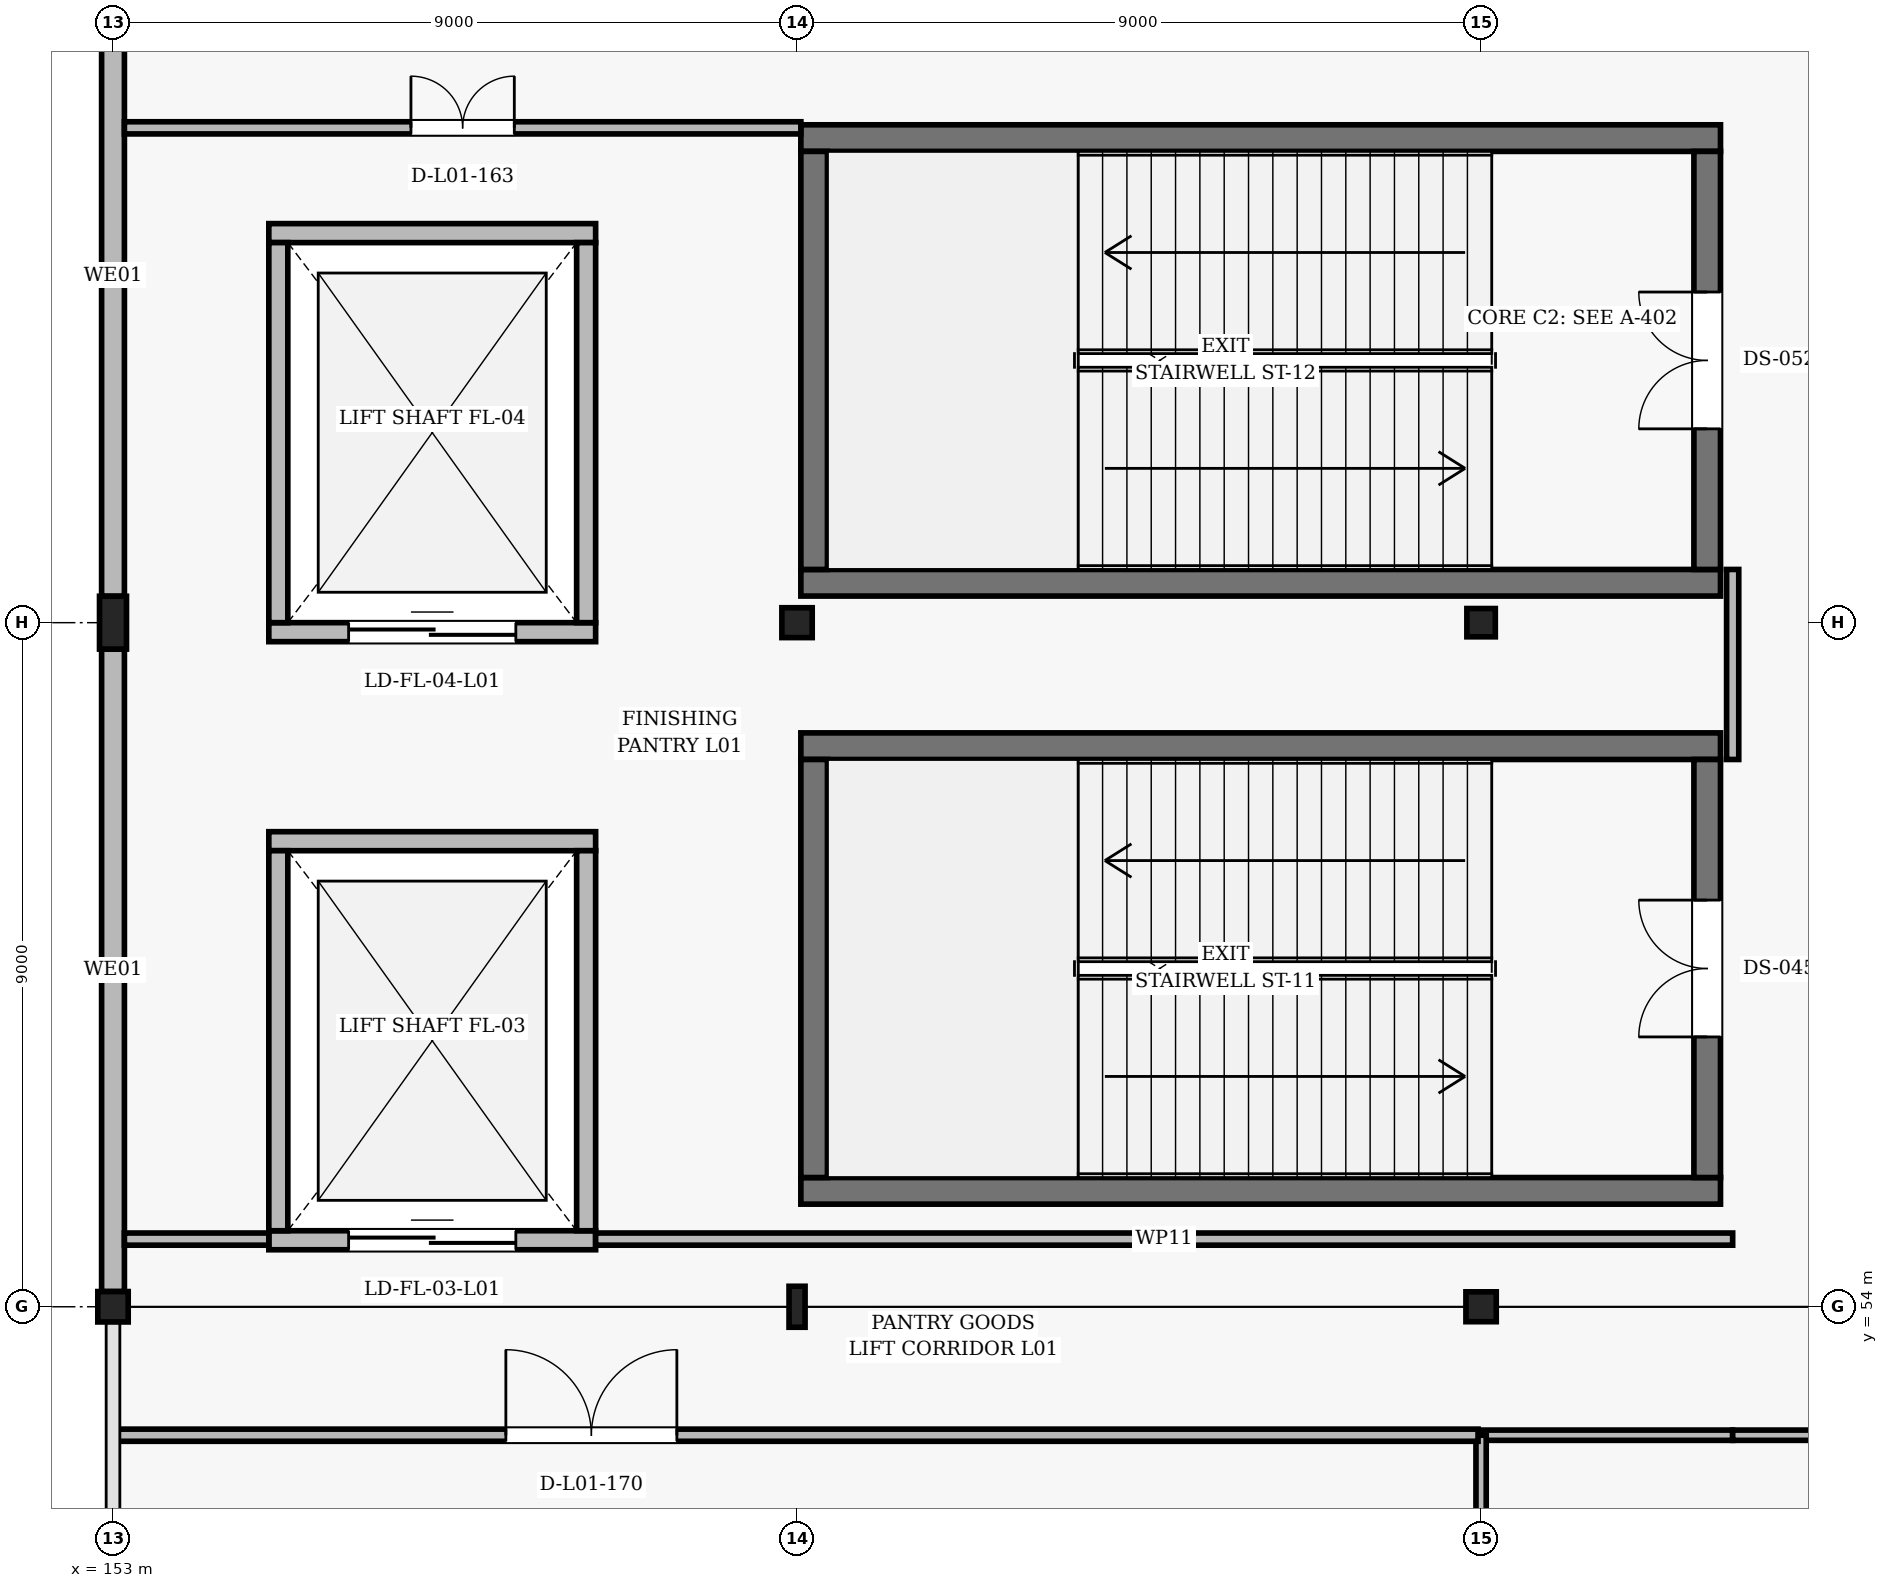
"""IFC4 building model, lengths in metres.
Left out: names, types, materials, properties, quantities, classifications, styles, units other than length and angle.
Written with IfcOpenShell. Run it as: python <this file> out.ifc"""

import sys

from ifc_helpers import new_model, si_unit, direction, frame, frame_2d, origin, origin_2d, place, context, subcontext, project, spatial, rectangle, hollow_rectangle, i_section, extrude, element, fill, save


model = new_model("IFC4")
c1 = context("Model", 3, precision=1e-05, world=origin(), true_north=direction((0.0, 1.0)))
c2 = subcontext(c1, "Body", "Model", "MODEL_VIEW")
j1 = project(units=[si_unit("LENGTHUNIT", "METRE"), si_unit("PLANEANGLEUNIT", "RADIAN")], contexts=[c1])
p1 = place(None, origin())
s1 = spatial("IfcSite", under=j1, at=p1, CompositionType="ELEMENT")
p2 = place(p1, origin())
s2 = spatial("IfcBuilding", under=s1, at=p2, CompositionType="ELEMENT")
p3 = place(p2, frame((0.0, 0.0, 5.4)))
s3 = spatial("IfcBuildingStorey", under=s2, at=p3, CompositionType="ELEMENT", Elevation=5.4)
p4 = place(p3, frame((153.0, 54.0, 0.0), z_axis=(0.0, 0.0, 1.0), x_axis=(1.0, 0.0, 0.0)))
e1 = element("IfcColumn", 1, at=p4, inside=s3, PredefinedType="COLUMN", context=c2, shape_type="SweptSolid", body=[
    extrude(hollow_rectangle(XDim=0.4, YDim=0.4, WallThickness=0.016, InnerFilletRadius=0.016, OuterFilletRadius=0.032, at=origin_2d()), origin(), (0.0, 0.0, 1.0), 5.4),
])
p5 = place(p3, frame((153.0, 63.0, 0.0), z_axis=(0.0, 0.0, 1.0), x_axis=(1.0, 0.0, 0.0)))
e2 = element("IfcColumn", 2, at=p5, inside=s3, PredefinedType="COLUMN", context=c2, shape_type="SweptSolid", body=[
    extrude(i_section(OverallWidth=0.355, OverallDepth=0.695, WebThickness=0.015, FlangeThickness=0.025, FilletRadius=0.018, at=origin_2d()), origin(), (0.0, 0.0, 1.0), 5.4),
])
p6 = place(p3, frame((162.0, 54.0, 0.0), z_axis=(0.0, 0.0, 1.0), x_axis=(1.0, 0.0, 0.0)))
e3 = element("IfcColumn", 3, at=p6, inside=s3, PredefinedType="COLUMN", context=c2, shape_type="SweptSolid", body=[
    extrude(i_section(OverallWidth=0.211, OverallDepth=0.539, WebThickness=0.012, FlangeThickness=0.019, FilletRadius=0.014, at=origin_2d()), origin(), (0.0, 0.0, 1.0), 5.4),
])
for number, where, z_axis, x_axis in (
    (4, (162.0, 63.0, 0.0), (0.0, 0.0, 1.0), (1.0, 0.0, 0.0)),
    (5, (171.0, 54.0, 0.0), (0.0, 0.0, 1.0), (1.0, 0.0, 0.0)),
):
    element("IfcColumn", number, at=place(p3, frame(where, z_axis=z_axis, x_axis=x_axis)), inside=s3, PredefinedType="COLUMN", context=c2, shape_type="SweptSolid", body=[
        extrude(i_section(OverallWidth=0.399, OverallDepth=0.393, WebThickness=0.023, FlangeThickness=0.037, FilletRadius=0.018, at=origin_2d()), origin(), (0.0, 0.0, 1.0), 5.4),
    ])
p7 = place(p3, frame((171.0, 63.0, 0.0), z_axis=(0.0, 0.0, 1.0), x_axis=(1.0, 0.0, 0.0)))
e6 = element("IfcColumn", 6, at=p7, inside=s3, PredefinedType="COLUMN", context=c2, shape_type="SweptSolid", body=[
    extrude(i_section(OverallWidth=0.374, OverallDepth=0.372, WebThickness=0.016, FlangeThickness=0.026, FilletRadius=0.016, at=origin_2d()), origin(), (0.0, 0.0, 1.0), 5.4),
])
p8 = place(p3, frame((153.0, 54.2, 0.0), z_axis=(0.0, 0.0, 1.0), x_axis=(0.0, 1.0, 0.0)))
e7 = element("IfcWall", 7, at=p8, inside=s3, PredefinedType="SOLIDWALL", context=c2, shape_type="SweptSolid", body=[
    extrude(rectangle(XDim=8.453, YDim=0.3, at=frame_2d((4.226, 0.0))), origin(), (0.0, 0.0, 1.0), 4.392),
])
p9 = place(p3, frame((153.0, 63.347, 0.0), z_axis=(0.0, 0.0, 1.0), x_axis=(0.0, 1.0, 0.0)))
e8 = element("IfcWall", 8, at=p9, inside=s3, PredefinedType="SOLIDWALL", context=c2, shape_type="SweptSolid", body=[
    extrude(rectangle(XDim=8.44, YDim=0.3, at=frame_2d((4.22, 0.0))), origin(), (0.0, 0.0, 1.0), 4.47),
])
for number, where, z_axis, x_axis in (
    (9, (162.05, 55.525, 0.0), (0.0, 0.0, 1.0), (1.0, 0.0, 0.0)),
    (10, (174.15, 61.375, 0.0), (0.0, 0.0, 1.0), (-1.0, 0.0, 0.0)),
):
    element("IfcWall", number, at=place(p3, frame(where, z_axis=z_axis, x_axis=x_axis)), inside=s3, PredefinedType="SHEAR", context=c2, shape_type="SweptSolid", body=[
        extrude(rectangle(XDim=12.1, YDim=0.35, at=frame_2d((6.05, 0.0))), origin(), (0.0, 0.0, 1.0), 5.18),
    ])
p10 = place(p3, frame((162.225, 61.2, 0.0), z_axis=(0.0, 0.0, 1.0), x_axis=(0.0, -1.0, 0.0)))
e11 = element("IfcWall", 11, at=p10, inside=s3, PredefinedType="SHEAR", context=c2, shape_type="SweptSolid", body=[
    extrude(rectangle(XDim=5.5, YDim=0.35, at=frame_2d((2.75, 0.0))), origin(), (0.0, 0.0, 1.0), 5.18),
])
p11 = place(p3, frame((173.975, 55.7, 0.0), z_axis=(0.0, 0.0, 1.0), x_axis=(0.0, 1.0, 0.0)))
e12 = element("IfcWall", 12, at=p11, inside=s3, PredefinedType="SHEAR", context=c2, shape_type="SweptSolid", body=[
    extrude(rectangle(XDim=5.5, YDim=0.35, at=frame_2d((2.75, 0.0))), origin(), (0.0, 0.0, 1.0), 5.18),
])
p12 = place(p11, frame((1.85, 0.0, 0.0)))
e13 = element("IfcOpeningElement", 13, at=p12, cuts=e12, PredefinedType="OPENING", context=c2, shape_type="SweptSolid", body=[
    extrude(rectangle(XDim=1.8, YDim=2.2, at=frame_2d((0.9, 1.1))), frame((0.0, 0.185, 0.0), z_axis=(0.0, -1.0, 0.0), x_axis=(1.0, 0.0, 0.0)), (0.0, 0.0, 1.0), 0.37),
])
for number, where, z_axis, x_axis in (
    (14, (162.05, 63.525, 0.0), (0.0, 0.0, 1.0), (1.0, 0.0, 0.0)),
    (15, (174.15, 69.375, 0.0), (0.0, 0.0, 1.0), (-1.0, 0.0, 0.0)),
):
    element("IfcWall", number, at=place(p3, frame(where, z_axis=z_axis, x_axis=x_axis)), inside=s3, PredefinedType="SHEAR", context=c2, shape_type="SweptSolid", body=[
        extrude(rectangle(XDim=12.1, YDim=0.35, at=frame_2d((6.05, 0.0))), origin(), (0.0, 0.0, 1.0), 5.18),
    ])
p13 = place(p3, frame((162.225, 69.2, 0.0), z_axis=(0.0, 0.0, 1.0), x_axis=(0.0, -1.0, 0.0)))
e16 = element("IfcWall", 16, at=p13, inside=s3, PredefinedType="SHEAR", context=c2, shape_type="SweptSolid", body=[
    extrude(rectangle(XDim=5.5, YDim=0.35, at=frame_2d((2.75, 0.0))), origin(), (0.0, 0.0, 1.0), 5.18),
])
p14 = place(p3, frame((173.975, 63.7, 0.0), z_axis=(0.0, 0.0, 1.0), x_axis=(0.0, 1.0, 0.0)))
e17 = element("IfcWall", 17, at=p14, inside=s3, PredefinedType="SHEAR", context=c2, shape_type="SweptSolid", body=[
    extrude(rectangle(XDim=5.5, YDim=0.35, at=frame_2d((2.75, 0.0))), origin(), (0.0, 0.0, 1.0), 5.18),
])
p15 = place(p14, frame((1.85, 0.0, 0.0)))
e18 = element("IfcOpeningElement", 18, at=p15, cuts=e17, PredefinedType="OPENING", context=c2, shape_type="SweptSolid", body=[
    extrude(rectangle(XDim=1.8, YDim=2.2, at=frame_2d((0.9, 1.1))), frame((0.0, 0.185, 0.0), z_axis=(0.0, -1.0, 0.0), x_axis=(1.0, 0.0, 0.0)), (0.0, 0.0, 1.0), 0.37),
])
p16 = place(p3, frame((155.05, 54.875, 0.0), z_axis=(0.0, 0.0, 1.0), x_axis=(1.0, 0.0, 0.0)))
e19 = element("IfcWall", 19, at=p16, inside=s3, PredefinedType="SOLIDWALL", context=c2, shape_type="SweptSolid", body=[
    extrude(rectangle(XDim=4.3, YDim=0.25, at=frame_2d((2.15, 0.0))), origin(), (0.0, 0.0, 1.0), 5.16),
])
p17 = place(p16, frame((1.05, 0.0, 0.0)))
e20 = element("IfcOpeningElement", 20, at=p17, cuts=e19, PredefinedType="OPENING", context=c2, shape_type="SweptSolid", body=[
    extrude(rectangle(XDim=2.2, YDim=2.5, at=frame_2d((1.1, 1.25))), frame((0.0, 0.135, 0.0), z_axis=(0.0, -1.0, 0.0), x_axis=(1.0, 0.0, 0.0)), (0.0, 0.0, 1.0), 0.27),
])
p18 = place(p3, frame((159.35, 60.125, 0.0), z_axis=(0.0, 0.0, 1.0), x_axis=(-1.0, 0.0, 0.0)))
e21 = element("IfcWall", 21, at=p18, inside=s3, PredefinedType="SOLIDWALL", context=c2, shape_type="SweptSolid", body=[
    extrude(rectangle(XDim=4.3, YDim=0.25, at=frame_2d((2.15, 0.0))), origin(), (0.0, 0.0, 1.0), 5.16),
])
for number, where, z_axis, x_axis in (
    (22, (155.175, 60.0, 0.0), (0.0, 0.0, 1.0), (0.0, -1.0, 0.0)),
    (23, (159.225, 55.0, 0.0), (0.0, 0.0, 1.0), (0.0, 1.0, 0.0)),
):
    element("IfcWall", number, at=place(p3, frame(where, z_axis=z_axis, x_axis=x_axis)), inside=s3, PredefinedType="SOLIDWALL", context=c2, shape_type="SweptSolid", body=[
        extrude(rectangle(XDim=5.0, YDim=0.25, at=frame_2d((2.5, 0.0))), origin(), (0.0, 0.0, 1.0), 5.16),
    ])
p19 = place(p3, frame((155.05, 62.875, 0.0), z_axis=(0.0, 0.0, 1.0), x_axis=(1.0, 0.0, 0.0)))
e24 = element("IfcWall", 24, at=p19, inside=s3, PredefinedType="SOLIDWALL", context=c2, shape_type="SweptSolid", body=[
    extrude(rectangle(XDim=4.3, YDim=0.25, at=frame_2d((2.15, 0.0))), origin(), (0.0, 0.0, 1.0), 5.16),
])
p20 = place(p19, frame((1.05, 0.0, 0.0)))
e25 = element("IfcOpeningElement", 25, at=p20, cuts=e24, PredefinedType="OPENING", context=c2, shape_type="SweptSolid", body=[
    extrude(rectangle(XDim=2.2, YDim=2.5, at=frame_2d((1.1, 1.25))), frame((0.0, 0.135, 0.0), z_axis=(0.0, -1.0, 0.0), x_axis=(1.0, 0.0, 0.0)), (0.0, 0.0, 1.0), 0.27),
])
p21 = place(p3, frame((159.35, 68.125, 0.0), z_axis=(0.0, 0.0, 1.0), x_axis=(-1.0, 0.0, 0.0)))
e26 = element("IfcWall", 26, at=p21, inside=s3, PredefinedType="SOLIDWALL", context=c2, shape_type="SweptSolid", body=[
    extrude(rectangle(XDim=4.3, YDim=0.25, at=frame_2d((2.15, 0.0))), origin(), (0.0, 0.0, 1.0), 5.16),
])
for number, where, z_axis, x_axis in (
    (27, (155.175, 68.0, 0.0), (0.0, 0.0, 1.0), (0.0, -1.0, 0.0)),
    (28, (159.225, 63.0, 0.0), (0.0, 0.0, 1.0), (0.0, 1.0, 0.0)),
):
    element("IfcWall", number, at=place(p3, frame(where, z_axis=z_axis, x_axis=x_axis)), inside=s3, PredefinedType="SOLIDWALL", context=c2, shape_type="SweptSolid", body=[
        extrude(rectangle(XDim=5.0, YDim=0.25, at=frame_2d((2.5, 0.0))), origin(), (0.0, 0.0, 1.0), 5.16),
    ])
p22 = place(p3, frame((153.15, 69.51, 0.0), z_axis=(0.0, 0.0, 1.0), x_axis=(1.0, 0.0, 0.0)))
e29 = element("IfcWall", 29, at=p22, inside=s3, PredefinedType="PARTITIONING", context=c2, shape_type="SweptSolid", body=[
    extrude(rectangle(XDim=8.9, YDim=0.16, at=frame_2d((4.45, 0.0))), origin(), (0.0, 0.0, 1.0), 4.47),
])
p23 = place(p22, frame((3.77, 0.0, 0.0)))
e30 = element("IfcOpeningElement", 30, at=p23, cuts=e29, PredefinedType="OPENING", context=c2, shape_type="SweptSolid", body=[
    extrude(rectangle(XDim=1.36, YDim=2.28, at=frame_2d((0.68, 1.14))), frame((0.0, 0.09, 0.0), z_axis=(0.0, -1.0, 0.0), x_axis=(1.0, 0.0, 0.0)), (0.0, 0.0, 1.0), 0.18),
])
p24 = place(p3, frame((174.31, 63.7, 0.0), z_axis=(0.0, 0.0, 1.0), x_axis=(0.0, -1.0, 0.0)))
e31 = element("IfcWall", 31, at=p24, inside=s3, PredefinedType="PARTITIONING", context=c2, shape_type="SweptSolid", body=[
    extrude(rectangle(XDim=2.5, YDim=0.16, at=frame_2d((1.25, 0.0))), origin(), (0.0, 0.0, 1.0), 4.554),
])
p25 = place(p3, frame((174.31, 54.89, 0.0), z_axis=(0.0, 0.0, 1.0), x_axis=(-1.0, 0.0, 0.0)))
e32 = element("IfcWall", 32, at=p25, inside=s3, PredefinedType="PARTITIONING", context=c2, shape_type="SweptSolid", body=[
    extrude(rectangle(XDim=14.96, YDim=0.16, at=frame_2d((7.48, 0.0))), origin(), (0.0, 0.0, 1.0), 4.481),
])
p26 = place(p3, frame((155.05, 54.89, 0.0), z_axis=(0.0, 0.0, 1.0), x_axis=(-1.0, 0.0, 0.0)))
e33 = element("IfcWall", 33, at=p26, inside=s3, PredefinedType="PARTITIONING", context=c2, shape_type="SweptSolid", body=[
    extrude(rectangle(XDim=1.9, YDim=0.16, at=frame_2d((0.95, 0.0))), origin(), (0.0, 0.0, 1.0), 4.392),
])
p27 = place(p3, frame((171.0, 52.31, 0.0), z_axis=(0.0, 0.0, 1.0), x_axis=(1.0, 0.0, 0.0)))
e34 = element("IfcWall", 34, at=p27, inside=s3, PredefinedType="PARTITIONING", context=c2, shape_type="SweptSolid", body=[
    extrude(rectangle(XDim=3.31, YDim=0.135, at=frame_2d((1.655, 0.0))), origin(), (0.0, 0.0, 1.0), 4.27),
])
p28 = place(p3, frame((174.31, 52.31, 0.0), z_axis=(0.0, 0.0, 1.0), x_axis=(1.0, 0.0, 0.0)))
e35 = element("IfcWall", 35, at=p28, inside=s3, PredefinedType="PARTITIONING", context=c2, shape_type="SweptSolid", body=[
    extrude(rectangle(XDim=4.94, YDim=0.135, at=frame_2d((2.47, 0.0))), origin(), (0.0, 0.0, 1.0), 4.668),
])
p29 = place(p28, frame((1.98, 0.0, 0.0)))
e36 = element("IfcOpeningElement", 36, at=p29, cuts=e35, PredefinedType="OPENING", context=c2, shape_type="SweptSolid", body=[
    extrude(rectangle(XDim=0.98, YDim=2.15, at=frame_2d((0.49, 1.075))), frame((0.0, 0.078, 0.0), z_axis=(0.0, -1.0, 0.0), x_axis=(1.0, 0.0, 0.0)), (0.0, 0.0, 1.0), 0.155),
])
p30 = place(p3, frame((171.0, 36.0, 0.0), z_axis=(0.0, 0.0, 1.0), x_axis=(0.0, 1.0, 0.0)))
e37 = element("IfcWall", 37, at=p30, inside=s3, PredefinedType="PARTITIONING", context=c2, shape_type="SweptSolid", body=[
    extrude(rectangle(XDim=16.31, YDim=0.135, at=frame_2d((8.155, 0.0))), origin(), (0.0, 0.0, 1.0), 3.125),
])
p31 = place(p3, frame((153.012, 52.31, 0.0), z_axis=(0.0, 0.0, 1.0), x_axis=(1.0, 0.0, 0.0)))
e38 = element("IfcWall", 38, at=p31, inside=s3, PredefinedType="PARTITIONING", context=c2, shape_type="SweptSolid", body=[
    extrude(rectangle(XDim=17.948, YDim=0.16, at=frame_2d((8.974, 0.0))), origin(), (0.0, 0.0, 1.0), 4.27),
])
p32 = place(p31, frame((5.157, 0.0, 0.0)))
e39 = element("IfcOpeningElement", 39, at=p32, cuts=e38, PredefinedType="OPENING", context=c2, shape_type="SweptSolid", body=[
    extrude(rectangle(XDim=2.25, YDim=2.4, at=frame_2d((1.125, 1.2))), frame((0.0, 0.09, 0.0), z_axis=(0.0, -1.0, 0.0), x_axis=(1.0, 0.0, 0.0)), (0.0, 0.0, 1.0), 0.18),
])
p33 = place(p12, origin())
e40 = element("IfcDoor", 40, at=p33, inside=s3, OperationType="DOUBLE_DOOR_SINGLE_SWING", PredefinedType="DOOR", context=c2, shape_type="SweptSolid", body=[
    extrude(rectangle(XDim=1.8, YDim=2.2, at=frame_2d((0.9, 1.1))), frame((0.0, 0.025, 0.0), z_axis=(0.0, -1.0, 0.0), x_axis=(1.0, 0.0, 0.0)), (0.0, 0.0, 1.0), 0.05),
])
fill(e13, e40)
p34 = place(p15, origin())
e41 = element("IfcDoor", 41, at=p34, inside=s3, OperationType="DOUBLE_DOOR_SINGLE_SWING", PredefinedType="DOOR", context=c2, shape_type="SweptSolid", body=[
    extrude(rectangle(XDim=1.8, YDim=2.2, at=frame_2d((0.9, 1.1))), frame((0.0, 0.025, 0.0), z_axis=(0.0, -1.0, 0.0), x_axis=(1.0, 0.0, 0.0)), (0.0, 0.0, 1.0), 0.05),
])
fill(e18, e41)
p35 = place(p17, origin())
e42 = element("IfcDoor", 42, at=p35, inside=s3, OperationType="DOUBLE_DOOR_SLIDING", PredefinedType="DOOR", context=c2, shape_type="SweptSolid", body=[
    extrude(rectangle(XDim=2.2, YDim=2.5, at=frame_2d((1.1, 1.25))), frame((0.0, 0.025, 0.0), z_axis=(0.0, -1.0, 0.0), x_axis=(1.0, 0.0, 0.0)), (0.0, 0.0, 1.0), 0.05),
])
fill(e20, e42)
p36 = place(p20, origin())
e43 = element("IfcDoor", 43, at=p36, inside=s3, OperationType="DOUBLE_DOOR_SLIDING", PredefinedType="DOOR", context=c2, shape_type="SweptSolid", body=[
    extrude(rectangle(XDim=2.2, YDim=2.5, at=frame_2d((1.1, 1.25))), frame((0.0, 0.025, 0.0), z_axis=(0.0, -1.0, 0.0), x_axis=(1.0, 0.0, 0.0)), (0.0, 0.0, 1.0), 0.05),
])
fill(e25, e43)
p37 = place(p23, origin())
e44 = element("IfcDoor", 44, at=p37, inside=s3, OperationType="DOUBLE_DOOR_SINGLE_SWING", PredefinedType="DOOR", context=c2, shape_type="SweptSolid", body=[
    extrude(rectangle(XDim=1.36, YDim=2.28, at=frame_2d((0.68, 1.14))), frame((0.0, 0.025, 0.0), z_axis=(0.0, -1.0, 0.0), x_axis=(1.0, 0.0, 0.0)), (0.0, 0.0, 1.0), 0.05),
])
fill(e30, e44)
p38 = place(p32, origin())
e45 = element("IfcDoor", 45, at=p38, inside=s3, OperationType="DOUBLE_DOOR_SINGLE_SWING", PredefinedType="DOOR", context=c2, shape_type="SweptSolid", body=[
    extrude(rectangle(XDim=2.25, YDim=2.4, at=frame_2d((1.125, 1.2))), frame((0.0, 0.025, 0.0), z_axis=(0.0, -1.0, 0.0), x_axis=(1.0, 0.0, 0.0)), (0.0, 0.0, 1.0), 0.05),
])
fill(e39, e45)
save(model, sys.argv[1])
